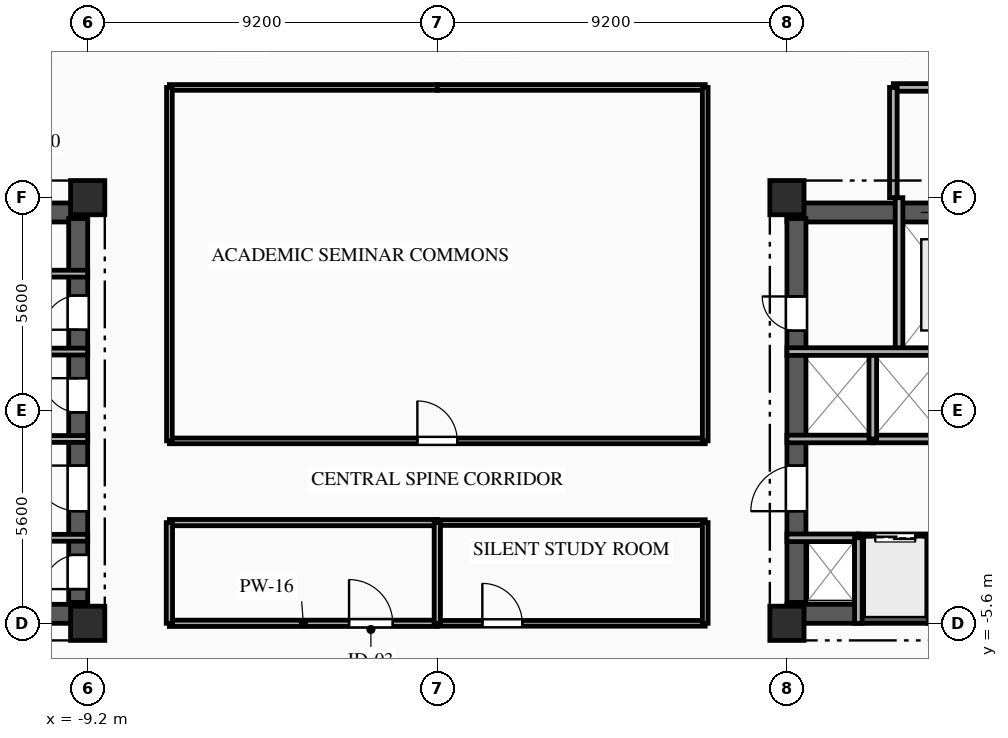
"""IFC4 building model, lengths in metres.
Left out: names, types, materials, properties, quantities, classifications, styles, units other than length and angle.
Written with IfcOpenShell. Run it as: python <this file> out.ifc"""

import sys

from ifc_helpers import new_model, si_unit, direction, frame, frame_2d, origin, origin_2d, place, context, subcontext, project, spatial, rectangle, extrude, element, fill, save


model = new_model("IFC4")
c1 = context("Model", 3, precision=1e-05, world=origin(), true_north=direction((0.0, 1.0)))
c2 = subcontext(c1, "Body", "Model", "MODEL_VIEW")
j1 = project(units=[si_unit("LENGTHUNIT", "METRE"), si_unit("PLANEANGLEUNIT", "RADIAN")], contexts=[c1])
p1 = place(None, origin())
s1 = spatial("IfcSite", under=j1, at=p1, CompositionType="ELEMENT")
p2 = place(p1, origin())
s2 = spatial("IfcBuilding", under=s1, at=p2, CompositionType="ELEMENT")
p3 = place(p2, frame((0.0, 0.0, 167.85)))
s3 = spatial("IfcBuildingStorey", under=s2, at=p3, CompositionType="ELEMENT", Elevation=167.85)
for number, where, z_axis, x_axis in (
    (1, (-9.2, -5.6, 0.0), (0.0, 0.0, 1.0), (1.0, 0.0, 0.0)),
    (2, (-9.2, 5.6, 0.0), (0.0, 0.0, 1.0), (1.0, 0.0, 0.0)),
    (3, (9.2, -5.6, 0.0), (0.0, 0.0, 1.0), (1.0, 0.0, 0.0)),
    (4, (9.2, 5.6, 0.0), (0.0, 0.0, 1.0), (1.0, 0.0, 0.0)),
):
    element("IfcColumn", number, at=place(p3, frame(where, z_axis=z_axis, x_axis=x_axis)), inside=s3, PredefinedType="COLUMN", context=c2, shape_type="SweptSolid", body=[
        extrude(rectangle(XDim=0.9, YDim=0.9, at=origin_2d()), origin(), (0.0, 0.0, 1.0), 3.35),
    ])
p4 = place(p3, frame((-18.8, 5.21, 0.0), z_axis=(0.0, 0.0, 1.0), x_axis=(1.0, 0.0, 0.0)))
e5 = element("IfcWall", 5, at=p4, inside=s3, PredefinedType="SHEAR", context=c2, shape_type="SweptSolid", body=[
    extrude(rectangle(XDim=9.6, YDim=0.5, at=frame_2d((4.8, 0.0))), origin(), (0.0, 0.0, 1.0), 3.04),
])
p5 = place(p4, frame((1.55, 0.0, 0.0)))
e6 = element("IfcOpeningElement", 6, at=p5, cuts=e5, PredefinedType="OPENING", context=c2, shape_type="SweptSolid", body=[
    extrude(rectangle(XDim=1.1, YDim=2.15, at=frame_2d((0.55, 1.075))), frame((0.0, 0.26, 0.0), z_axis=(0.0, -1.0, 0.0), x_axis=(1.0, 0.0, 0.0)), (0.0, 0.0, 1.0), 0.52),
])
p6 = place(p4, frame((4.775, 0.0, 0.0)))
e7 = element("IfcOpeningElement", 7, at=p6, cuts=e5, PredefinedType="OPENING", context=c2, shape_type="SweptSolid", body=[
    extrude(rectangle(XDim=1.05, YDim=2.1, at=frame_2d((0.525, 1.05))), frame((0.0, 0.26, 0.0), z_axis=(0.0, -1.0, 0.0), x_axis=(1.0, 0.0, 0.0)), (0.0, 0.0, 1.0), 0.52),
])
p7 = place(p3, frame((-18.8, -5.35, 0.0), z_axis=(0.0, 0.0, 1.0), x_axis=(1.0, 0.0, 0.0)))
e8 = element("IfcWall", 8, at=p7, inside=s3, PredefinedType="SHEAR", context=c2, shape_type="SweptSolid", body=[
    extrude(rectangle(XDim=9.6, YDim=0.5, at=frame_2d((4.8, 0.0))), origin(), (0.0, 0.0, 1.0), 3.04),
])
p8 = place(p7, frame((1.05, 0.0, 0.0)))
e9 = element("IfcOpeningElement", 9, at=p8, cuts=e8, PredefinedType="OPENING", context=c2, shape_type="SweptSolid", body=[
    extrude(rectangle(XDim=0.9, YDim=2.1, at=frame_2d((0.45, 1.05))), frame((0.0, 0.26, 0.0), z_axis=(0.0, -1.0, 0.0), x_axis=(1.0, 0.0, 0.0)), (0.0, 0.0, 1.0), 0.52),
])
p9 = place(p3, frame((-9.45, -5.05, 0.0), z_axis=(0.0, 0.0, 1.0), x_axis=(0.0, 1.0, 0.0)))
e10 = element("IfcWall", 10, at=p9, inside=s3, PredefinedType="SHEAR", context=c2, shape_type="SweptSolid", body=[
    extrude(rectangle(XDim=10.1, YDim=0.5, at=frame_2d((5.05, 0.0))), origin(), (0.0, 0.0, 1.0), 3.04),
])
p10 = place(p9, frame((7.175, 0.0, 0.0)))
e11 = element("IfcOpeningElement", 11, at=p10, cuts=e10, PredefinedType="OPENING", context=c2, shape_type="SweptSolid", body=[
    extrude(rectangle(XDim=0.9, YDim=2.1, at=frame_2d((0.45, 1.05))), frame((0.0, 0.26, 0.0), z_axis=(0.0, -1.0, 0.0), x_axis=(1.0, 0.0, 0.0)), (0.0, 0.0, 1.0), 0.52),
])
p11 = place(p9, frame((2.4, 0.0, 0.0)))
e12 = element("IfcOpeningElement", 12, at=p11, cuts=e10, PredefinedType="OPENING", context=c2, shape_type="SweptSolid", body=[
    extrude(rectangle(XDim=1.2, YDim=2.15, at=frame_2d((0.6, 1.075))), frame((0.0, 0.26, 0.0), z_axis=(0.0, -1.0, 0.0), x_axis=(1.0, 0.0, 0.0)), (0.0, 0.0, 1.0), 0.52),
])
p12 = place(p9, frame((0.35, 0.0, 0.0)))
e13 = element("IfcOpeningElement", 13, at=p12, cuts=e10, PredefinedType="OPENING", context=c2, shape_type="SweptSolid", body=[
    extrude(rectangle(XDim=0.9, YDim=2.1, at=frame_2d((0.45, 1.05))), frame((0.0, 0.26, 0.0), z_axis=(0.0, -1.0, 0.0), x_axis=(1.0, 0.0, 0.0)), (0.0, 0.0, 1.0), 0.52),
])
p13 = place(p9, frame((5.0, 0.0, 0.0)))
e14 = element("IfcOpeningElement", 14, at=p13, cuts=e10, PredefinedType="OPENING", context=c2, shape_type="SweptSolid", body=[
    extrude(rectangle(XDim=0.9, YDim=2.1, at=frame_2d((0.45, 1.05))), frame((0.0, 0.26, 0.0), z_axis=(0.0, -1.0, 0.0), x_axis=(1.0, 0.0, 0.0)), (0.0, 0.0, 1.0), 0.52),
])
p14 = place(p3, frame((9.2, 5.21, 0.0), z_axis=(0.0, 0.0, 1.0), x_axis=(1.0, 0.0, 0.0)))
e15 = element("IfcWall", 15, at=p14, inside=s3, PredefinedType="SHEAR", context=c2, shape_type="SweptSolid", body=[
    extrude(rectangle(XDim=9.6, YDim=0.5, at=frame_2d((4.8, 0.0))), origin(), (0.0, 0.0, 1.0), 3.04),
])
p15 = place(p14, frame((6.95, 0.0, 0.0)))
e16 = element("IfcOpeningElement", 16, at=p15, cuts=e15, PredefinedType="OPENING", context=c2, shape_type="SweptSolid", body=[
    extrude(rectangle(XDim=1.1, YDim=2.15, at=frame_2d((0.55, 1.075))), frame((0.0, 0.26, 0.0), z_axis=(0.0, -1.0, 0.0), x_axis=(1.0, 0.0, 0.0)), (0.0, 0.0, 1.0), 0.52),
])
p16 = place(p14, frame((3.775, 0.0, 0.0)))
e17 = element("IfcOpeningElement", 17, at=p16, cuts=e15, PredefinedType="OPENING", context=c2, shape_type="SweptSolid", body=[
    extrude(rectangle(XDim=1.05, YDim=2.1, at=frame_2d((0.525, 1.05))), frame((0.0, 0.26, 0.0), z_axis=(0.0, -1.0, 0.0), x_axis=(1.0, 0.0, 0.0)), (0.0, 0.0, 1.0), 0.52),
])
p17 = place(p3, frame((9.2, -5.35, 0.0), z_axis=(0.0, 0.0, 1.0), x_axis=(1.0, 0.0, 0.0)))
e18 = element("IfcWall", 18, at=p17, inside=s3, PredefinedType="SHEAR", context=c2, shape_type="SweptSolid", body=[
    extrude(rectangle(XDim=9.6, YDim=0.5, at=frame_2d((4.8, 0.0))), origin(), (0.0, 0.0, 1.0), 3.04),
])
p18 = place(p17, frame((7.65, 0.0, 0.0)))
e19 = element("IfcOpeningElement", 19, at=p18, cuts=e18, PredefinedType="OPENING", context=c2, shape_type="SweptSolid", body=[
    extrude(rectangle(XDim=0.9, YDim=2.1, at=frame_2d((0.45, 1.05))), frame((0.0, 0.26, 0.0), z_axis=(0.0, -1.0, 0.0), x_axis=(1.0, 0.0, 0.0)), (0.0, 0.0, 1.0), 0.52),
])
p19 = place(p3, frame((9.45, -5.05, 0.0), z_axis=(0.0, 0.0, 1.0), x_axis=(0.0, 1.0, 0.0)))
e20 = element("IfcWall", 20, at=p19, inside=s3, PredefinedType="SHEAR", context=c2, shape_type="SweptSolid", body=[
    extrude(rectangle(XDim=10.1, YDim=0.5, at=frame_2d((5.05, 0.0))), origin(), (0.0, 0.0, 1.0), 3.04),
])
p20 = place(p19, frame((7.15, 0.0, 0.0)))
e21 = element("IfcOpeningElement", 21, at=p20, cuts=e20, PredefinedType="OPENING", context=c2, shape_type="SweptSolid", body=[
    extrude(rectangle(XDim=0.9, YDim=2.1, at=frame_2d((0.45, 1.05))), frame((0.0, 0.26, 0.0), z_axis=(0.0, -1.0, 0.0), x_axis=(1.0, 0.0, 0.0)), (0.0, 0.0, 1.0), 0.52),
])
p21 = place(p19, frame((2.4, 0.0, 0.0)))
e22 = element("IfcOpeningElement", 22, at=p21, cuts=e20, PredefinedType="OPENING", context=c2, shape_type="SweptSolid", body=[
    extrude(rectangle(XDim=1.2, YDim=2.15, at=frame_2d((0.6, 1.075))), frame((0.0, 0.26, 0.0), z_axis=(0.0, -1.0, 0.0), x_axis=(1.0, 0.0, 0.0)), (0.0, 0.0, 1.0), 0.52),
])
p22 = place(p3, frame((-9.2, 3.6, 0.0), z_axis=(0.0, 0.0, 1.0), x_axis=(-1.0, 0.0, 0.0)))
e23 = element("IfcWall", 23, at=p22, inside=s3, PredefinedType="PARTITIONING", context=c2, shape_type="SweptSolid", body=[
    extrude(rectangle(XDim=2.95, YDim=0.18, at=frame_2d((1.475, 0.0))), origin(), (0.0, 0.0, 1.0), 3.04),
])
p23 = place(p22, frame((1.7, 0.0, 0.0)))
e24 = element("IfcOpeningElement", 24, at=p23, cuts=e23, PredefinedType="OPENING", context=c2, shape_type="SweptSolid", body=[
    extrude(rectangle(XDim=0.9, YDim=2.1, at=frame_2d((0.45, 1.05))), frame((0.0, 0.1, 0.0), z_axis=(0.0, -1.0, 0.0), x_axis=(1.0, 0.0, 0.0)), (0.0, 0.0, 1.0), 0.2),
])
p24 = place(p3, frame((-12.15, 1.55, 0.0), z_axis=(0.0, 0.0, 1.0), x_axis=(1.0, 0.0, 0.0)))
e25 = element("IfcWall", 25, at=p24, inside=s3, PredefinedType="PARTITIONING", context=c2, shape_type="SweptSolid", body=[
    extrude(rectangle(XDim=2.95, YDim=0.18, at=frame_2d((1.475, 0.0))), origin(), (0.0, 0.0, 1.0), 3.04),
])
p25 = place(p3, frame((-15.05, -3.35, 0.0), z_axis=(0.0, 0.0, 1.0), x_axis=(1.0, 0.0, 0.0)))
e26 = element("IfcWall", 26, at=p25, inside=s3, PredefinedType="PARTITIONING", context=c2, shape_type="SweptSolid", body=[
    extrude(rectangle(XDim=5.85, YDim=0.18, at=frame_2d((2.925, 0.0))), origin(), (0.0, 0.0, 1.0), 2.755),
])
p26 = place(p3, frame((-9.2, -0.75, 0.0), z_axis=(0.0, 0.0, 1.0), x_axis=(-1.0, 0.0, 0.0)))
e27 = element("IfcWall", 27, at=p26, inside=s3, PredefinedType="PARTITIONING", context=c2, shape_type="SweptSolid", body=[
    extrude(rectangle(XDim=5.85, YDim=0.18, at=frame_2d((2.925, 0.0))), origin(), (0.0, 0.0, 1.0), 3.04),
])
p27 = place(p3, frame((12.15, 5.6, 0.0), z_axis=(0.0, 0.0, 1.0), x_axis=(0.0, -1.0, 0.0)))
e28 = element("IfcWall", 28, at=p27, inside=s3, PredefinedType="PARTITIONING", context=c2, shape_type="SweptSolid", body=[
    extrude(rectangle(XDim=4.05, YDim=0.2, at=frame_2d((2.025, 0.0))), origin(), (0.0, 0.0, 1.0), 3.04),
])
p28 = place(p3, frame((18.8, 8.5, 0.0), z_axis=(0.0, 0.0, 1.0), x_axis=(-1.0, 0.0, 0.0)))
e29 = element("IfcWall", 29, at=p28, inside=s3, PredefinedType="PARTITIONING", context=c2, shape_type="SweptSolid", body=[
    extrude(rectangle(XDim=6.8, YDim=0.2, at=frame_2d((3.4, 0.0))), origin(), (0.0, 0.0, 1.0), 3.04),
])
p29 = place(p28, frame((3.985, 0.0, 0.0)))
e30 = element("IfcOpeningElement", 30, at=p29, cuts=e29, PredefinedType="OPENING", context=c2, shape_type="SweptSolid", body=[
    extrude(rectangle(XDim=1.1, YDim=2.15, at=frame_2d((0.55, 1.075))), frame((0.0, 0.11, 0.0), z_axis=(0.0, -1.0, 0.0), x_axis=(1.0, 0.0, 0.0)), (0.0, 0.0, 1.0), 0.22),
])
p30 = place(p3, frame((12.0, 8.5, 0.0), z_axis=(0.0, 0.0, 1.0), x_axis=(0.0, -1.0, 0.0)))
e31 = element("IfcWall", 31, at=p30, inside=s3, PredefinedType="PARTITIONING", context=c2, shape_type="SweptSolid", body=[
    extrude(rectangle(XDim=2.9, YDim=0.2, at=frame_2d((1.45, 0.0))), origin(), (0.0, 0.0, 1.0), 3.04),
])
p31 = place(p3, frame((9.2, -3.35, 0.0), z_axis=(0.0, 0.0, 1.0), x_axis=(1.0, 0.0, 0.0)))
e32 = element("IfcWall", 32, at=p31, inside=s3, PredefinedType="PARTITIONING", context=c2, shape_type="SweptSolid", body=[
    extrude(rectangle(XDim=1.88, YDim=0.2, at=frame_2d((0.94, 0.0))), origin(), (0.0, 0.0, 1.0), 2.755),
])
p32 = place(p3, frame((11.08, -3.35, 0.0), z_axis=(0.0, 0.0, 1.0), x_axis=(1.0, 0.0, 0.0)))
e33 = element("IfcWall", 33, at=p32, inside=s3, PredefinedType="PARTITIONING", context=c2, shape_type="SweptSolid", body=[
    extrude(rectangle(XDim=1.94, YDim=0.2, at=frame_2d((0.97, 0.0))), origin(), (0.0, 0.0, 1.0), 3.04),
])
p33 = place(p32, frame((0.445, 0.0, 0.0)))
e34 = element("IfcOpeningElement", 34, at=p33, cuts=e33, PredefinedType="OPENING", context=c2, shape_type="SweptSolid", body=[
    extrude(rectangle(XDim=1.05, YDim=2.1, at=frame_2d((0.525, 1.05))), frame((0.0, 0.11, 0.0), z_axis=(0.0, -1.0, 0.0), x_axis=(1.0, 0.0, 0.0)), (0.0, 0.0, 1.0), 0.22),
])
p34 = place(p3, frame((11.46, -0.75, 0.0), z_axis=(0.0, 0.0, 1.0), x_axis=(-1.0, 0.0, 0.0)))
e35 = element("IfcWall", 35, at=p34, inside=s3, PredefinedType="PARTITIONING", context=c2, shape_type="SweptSolid", body=[
    extrude(rectangle(XDim=2.26, YDim=0.2, at=frame_2d((1.13, 0.0))), origin(), (0.0, 0.0, 1.0), 3.04),
])
p35 = place(p3, frame((13.34, -0.75, 0.0), z_axis=(0.0, 0.0, 1.0), x_axis=(-1.0, 0.0, 0.0)))
e36 = element("IfcWall", 36, at=p35, inside=s3, PredefinedType="PARTITIONING", context=c2, shape_type="SweptSolid", body=[
    extrude(rectangle(XDim=1.88, YDim=0.2, at=frame_2d((0.94, 0.0))), origin(), (0.0, 0.0, 1.0), 3.04),
])
for number, where, z_axis, x_axis in (
    (37, (11.08, -5.6, 0.0), (0.0, 0.0, 1.0), (0.0, 1.0, 0.0)),
    (38, (13.02, -5.6, 0.0), (0.0, 0.0, 1.0), (0.0, 1.0, 0.0)),
):
    element("IfcWall", number, at=place(p3, frame(where, z_axis=z_axis, x_axis=x_axis)), inside=s3, PredefinedType="PARTITIONING", context=c2, shape_type="SweptSolid", body=[
        extrude(rectangle(XDim=2.25, YDim=0.2, at=frame_2d((1.125, 0.0))), origin(), (0.0, 0.0, 1.0), 3.04),
    ])
p36 = place(p3, frame((11.46, -0.75, 0.0), z_axis=(0.0, 0.0, 1.0), x_axis=(0.0, 1.0, 0.0)))
e39 = element("IfcWall", 39, at=p36, inside=s3, PredefinedType="PARTITIONING", context=c2, shape_type="SweptSolid", body=[
    extrude(rectangle(XDim=2.3, YDim=0.2, at=frame_2d((1.15, 0.0))), origin(), (0.0, 0.0, 1.0), 3.04),
])
for number, where, z_axis, x_axis in (
    (40, (0.0, 8.5, 0.0), (0.0, 0.0, 1.0), (-1.0, 0.0, 0.0)),
    (41, (7.05, 8.5, 0.0), (0.0, 0.0, 1.0), (-1.0, 0.0, 0.0)),
):
    element("IfcWall", number, at=place(p3, frame(where, z_axis=z_axis, x_axis=x_axis)), inside=s3, PredefinedType="PARTITIONING", context=c2, shape_type="SweptSolid", body=[
        extrude(rectangle(XDim=7.05, YDim=0.15, at=frame_2d((3.525, 0.0))), origin(), (0.0, 0.0, 1.0), 3.04),
    ])
p37 = place(p3, frame((-7.05, -5.6, 0.0), z_axis=(0.0, 0.0, 1.0), x_axis=(1.0, 0.0, 0.0)))
e42 = element("IfcWall", 42, at=p37, inside=s3, PredefinedType="PARTITIONING", context=c2, shape_type="SweptSolid", body=[
    extrude(rectangle(XDim=7.05, YDim=0.165, at=frame_2d((3.525, 0.0))), origin(), (0.0, 0.0, 1.0), 2.525),
])
p38 = place(p37, frame((4.728, 0.0, 0.0)))
e43 = element("IfcOpeningElement", 43, at=p38, cuts=e42, PredefinedType="OPENING", context=c2, shape_type="SweptSolid", body=[
    extrude(rectangle(XDim=1.15, YDim=2.15, at=frame_2d((0.575, 1.075))), frame((0.0, 0.093, 0.0), z_axis=(0.0, -1.0, 0.0), x_axis=(1.0, 0.0, 0.0)), (0.0, 0.0, 1.0), 0.185),
])
p39 = place(p3, frame((0.0, -5.6, 0.0), z_axis=(0.0, 0.0, 1.0), x_axis=(1.0, 0.0, 0.0)))
e44 = element("IfcWall", 44, at=p39, inside=s3, PredefinedType="PARTITIONING", context=c2, shape_type="SweptSolid", body=[
    extrude(rectangle(XDim=7.05, YDim=0.15, at=frame_2d((3.525, 0.0))), origin(), (0.0, 0.0, 1.0), 2.525),
])
p40 = place(p39, frame((1.185, 0.0, 0.0)))
e45 = element("IfcOpeningElement", 45, at=p40, cuts=e44, PredefinedType="OPENING", context=c2, shape_type="SweptSolid", body=[
    extrude(rectangle(XDim=1.05, YDim=2.15, at=frame_2d((0.525, 1.075))), frame((0.0, 0.085, 0.0), z_axis=(0.0, -1.0, 0.0), x_axis=(1.0, 0.0, 0.0)), (0.0, 0.0, 1.0), 0.17),
])
p41 = place(p3, frame((-7.05, -0.8, 0.0), z_axis=(0.0, 0.0, 1.0), x_axis=(1.0, 0.0, 0.0)))
e46 = element("IfcWall", 46, at=p41, inside=s3, PredefinedType="PARTITIONING", context=c2, shape_type="SweptSolid", body=[
    extrude(rectangle(XDim=14.1, YDim=0.15, at=frame_2d((7.05, 0.0))), origin(), (0.0, 0.0, 1.0), 3.04),
])
p42 = place(p41, frame((6.525, 0.0, 0.0)))
e47 = element("IfcOpeningElement", 47, at=p42, cuts=e46, PredefinedType="OPENING", context=c2, shape_type="SweptSolid", body=[
    extrude(rectangle(XDim=1.05, YDim=2.15, at=frame_2d((0.525, 1.075))), frame((0.0, 0.085, 0.0), z_axis=(0.0, -1.0, 0.0), x_axis=(1.0, 0.0, 0.0)), (0.0, 0.0, 1.0), 0.17),
])
p43 = place(p3, frame((0.0, -2.95, 0.0), z_axis=(0.0, 0.0, 1.0), x_axis=(-1.0, 0.0, 0.0)))
e48 = element("IfcWall", 48, at=p43, inside=s3, PredefinedType="PARTITIONING", context=c2, shape_type="SweptSolid", body=[
    extrude(rectangle(XDim=7.05, YDim=0.165, at=frame_2d((3.525, 0.0))), origin(), (0.0, 0.0, 1.0), 3.04),
])
p44 = place(p3, frame((7.05, -2.95, 0.0), z_axis=(0.0, 0.0, 1.0), x_axis=(-1.0, 0.0, 0.0)))
e49 = element("IfcWall", 49, at=p44, inside=s3, PredefinedType="PARTITIONING", context=c2, shape_type="SweptSolid", body=[
    extrude(rectangle(XDim=7.05, YDim=0.15, at=frame_2d((3.525, 0.0))), origin(), (0.0, 0.0, 1.0), 3.04),
])
p45 = place(p3, frame((-7.05, 8.5, 0.0), z_axis=(0.0, 0.0, 1.0), x_axis=(0.0, -1.0, 0.0)))
e50 = element("IfcWall", 50, at=p45, inside=s3, PredefinedType="PARTITIONING", context=c2, shape_type="SweptSolid", body=[
    extrude(rectangle(XDim=9.3, YDim=0.15, at=frame_2d((4.65, 0.0))), origin(), (0.0, 0.0, 1.0), 3.04),
])
p46 = place(p3, frame((-7.05, -2.95, 0.0), z_axis=(0.0, 0.0, 1.0), x_axis=(0.0, -1.0, 0.0)))
e51 = element("IfcWall", 51, at=p46, inside=s3, PredefinedType="PARTITIONING", context=c2, shape_type="SweptSolid", body=[
    extrude(rectangle(XDim=2.65, YDim=0.165, at=frame_2d((1.325, 0.0))), origin(), (0.0, 0.0, 1.0), 3.04),
])
p47 = place(p3, frame((7.05, -0.8, 0.0), z_axis=(0.0, 0.0, 1.0), x_axis=(0.0, 1.0, 0.0)))
e52 = element("IfcWall", 52, at=p47, inside=s3, PredefinedType="PARTITIONING", context=c2, shape_type="SweptSolid", body=[
    extrude(rectangle(XDim=9.3, YDim=0.15, at=frame_2d((4.65, 0.0))), origin(), (0.0, 0.0, 1.0), 3.04),
])
p48 = place(p3, frame((7.05, -5.6, 0.0), z_axis=(0.0, 0.0, 1.0), x_axis=(0.0, 1.0, 0.0)))
e53 = element("IfcWall", 53, at=p48, inside=s3, PredefinedType="PARTITIONING", context=c2, shape_type="SweptSolid", body=[
    extrude(rectangle(XDim=2.65, YDim=0.15, at=frame_2d((1.325, 0.0))), origin(), (0.0, 0.0, 1.0), 3.04),
])
p49 = place(p3, frame((0.0, -2.95, 0.0), z_axis=(0.0, 0.0, 1.0), x_axis=(0.0, -1.0, 0.0)))
e54 = element("IfcWall", 54, at=p49, inside=s3, PredefinedType="PARTITIONING", context=c2, shape_type="SweptSolid", body=[
    extrude(rectangle(XDim=2.65, YDim=0.165, at=frame_2d((1.325, 0.0))), origin(), (0.0, 0.0, 1.0), 3.04),
])
p50 = place(p3, frame((9.2, 1.55, 0.0), z_axis=(0.0, 0.0, 1.0), x_axis=(1.0, 0.0, 0.0)))
e55 = element("IfcWall", 55, at=p50, inside=s3, PredefinedType="PARTITIONING", context=c2, shape_type="SweptSolid", body=[
    extrude(rectangle(XDim=5.82, YDim=0.2, at=frame_2d((2.91, 0.0))), origin(), (0.0, 0.0, 1.0), 3.04),
])
p51 = place(p10, origin())
e56 = element("IfcDoor", 56, at=p51, inside=s3, OperationType="SINGLE_SWING_LEFT", PredefinedType="DOOR", context=c2, shape_type="SweptSolid", body=[
    extrude(rectangle(XDim=0.9, YDim=2.1, at=frame_2d((0.45, 1.05))), frame((0.0, 0.025, 0.0), z_axis=(0.0, -1.0, 0.0), x_axis=(1.0, 0.0, 0.0)), (0.0, 0.0, 1.0), 0.05),
])
fill(e11, e56)
p52 = place(p11, origin())
e57 = element("IfcDoor", 57, at=p52, inside=s3, OperationType="SINGLE_SWING_RIGHT", PredefinedType="DOOR", context=c2, shape_type="SweptSolid", body=[
    extrude(rectangle(XDim=1.2, YDim=2.15, at=frame_2d((0.6, 1.075))), frame((0.0, 0.025, 0.0), z_axis=(0.0, -1.0, 0.0), x_axis=(1.0, 0.0, 0.0)), (0.0, 0.0, 1.0), 0.05),
])
fill(e12, e57)
p53 = place(p12, origin())
e58 = element("IfcDoor", 58, at=p53, inside=s3, OperationType="SINGLE_SWING_LEFT", PredefinedType="DOOR", context=c2, shape_type="SweptSolid", body=[
    extrude(rectangle(XDim=0.9, YDim=2.1, at=frame_2d((0.45, 1.05))), frame((0.0, 0.025, 0.0), z_axis=(0.0, -1.0, 0.0), x_axis=(1.0, 0.0, 0.0)), (0.0, 0.0, 1.0), 0.05),
])
fill(e13, e58)
p54 = place(p13, origin())
e59 = element("IfcDoor", 59, at=p54, inside=s3, OperationType="SINGLE_SWING_RIGHT", PredefinedType="DOOR", context=c2, shape_type="SweptSolid", body=[
    extrude(rectangle(XDim=0.9, YDim=2.1, at=frame_2d((0.45, 1.05))), frame((0.0, 0.025, 0.0), z_axis=(0.0, -1.0, 0.0), x_axis=(1.0, 0.0, 0.0)), (0.0, 0.0, 1.0), 0.05),
])
fill(e14, e59)
p55 = place(p20, origin())
e60 = element("IfcDoor", 60, at=p55, inside=s3, OperationType="SINGLE_SWING_RIGHT", PredefinedType="DOOR", context=c2, shape_type="SweptSolid", body=[
    extrude(rectangle(XDim=0.9, YDim=2.1, at=frame_2d((0.45, 1.05))), frame((0.0, 0.025, 0.0), z_axis=(0.0, -1.0, 0.0), x_axis=(1.0, 0.0, 0.0)), (0.0, 0.0, 1.0), 0.05),
])
fill(e21, e60)
p56 = place(p33, origin())
e61 = element("IfcDoor", 61, at=p56, inside=s3, OperationType="DOUBLE_DOOR_SLIDING", PredefinedType="DOOR", context=c2, shape_type="SweptSolid", body=[
    extrude(rectangle(XDim=1.05, YDim=2.1, at=frame_2d((0.525, 1.05))), frame((0.0, 0.025, 0.0), z_axis=(0.0, -1.0, 0.0), x_axis=(1.0, 0.0, 0.0)), (0.0, 0.0, 1.0), 0.05),
])
fill(e34, e61)
p57 = place(p21, origin())
e62 = element("IfcDoor", 62, at=p57, inside=s3, OperationType="SINGLE_SWING_LEFT", PredefinedType="DOOR", context=c2, shape_type="SweptSolid", body=[
    extrude(rectangle(XDim=1.2, YDim=2.15, at=frame_2d((0.6, 1.075))), frame((0.0, 0.025, 0.0), z_axis=(0.0, -1.0, 0.0), x_axis=(1.0, 0.0, 0.0)), (0.0, 0.0, 1.0), 0.05),
])
fill(e22, e62)
p58 = place(p38, origin())
e63 = element("IfcDoor", 63, at=p58, inside=s3, OperationType="SINGLE_SWING_LEFT", PredefinedType="DOOR", context=c2, shape_type="SweptSolid", body=[
    extrude(rectangle(XDim=1.15, YDim=2.15, at=frame_2d((0.575, 1.075))), frame((0.0, 0.025, 0.0), z_axis=(0.0, -1.0, 0.0), x_axis=(1.0, 0.0, 0.0)), (0.0, 0.0, 1.0), 0.05),
])
fill(e43, e63)
p59 = place(p40, origin())
e64 = element("IfcDoor", 64, at=p59, inside=s3, OperationType="SINGLE_SWING_LEFT", PredefinedType="DOOR", context=c2, shape_type="SweptSolid", body=[
    extrude(rectangle(XDim=1.05, YDim=2.15, at=frame_2d((0.525, 1.075))), frame((0.0, 0.025, 0.0), z_axis=(0.0, -1.0, 0.0), x_axis=(1.0, 0.0, 0.0)), (0.0, 0.0, 1.0), 0.05),
])
fill(e45, e64)
p60 = place(p42, origin())
e65 = element("IfcDoor", 65, at=p60, inside=s3, OperationType="SINGLE_SWING_LEFT", PredefinedType="DOOR", context=c2, shape_type="SweptSolid", body=[
    extrude(rectangle(XDim=1.05, YDim=2.15, at=frame_2d((0.525, 1.075))), frame((0.0, 0.025, 0.0), z_axis=(0.0, -1.0, 0.0), x_axis=(1.0, 0.0, 0.0)), (0.0, 0.0, 1.0), 0.05),
])
fill(e47, e65)
save(model, sys.argv[1])
